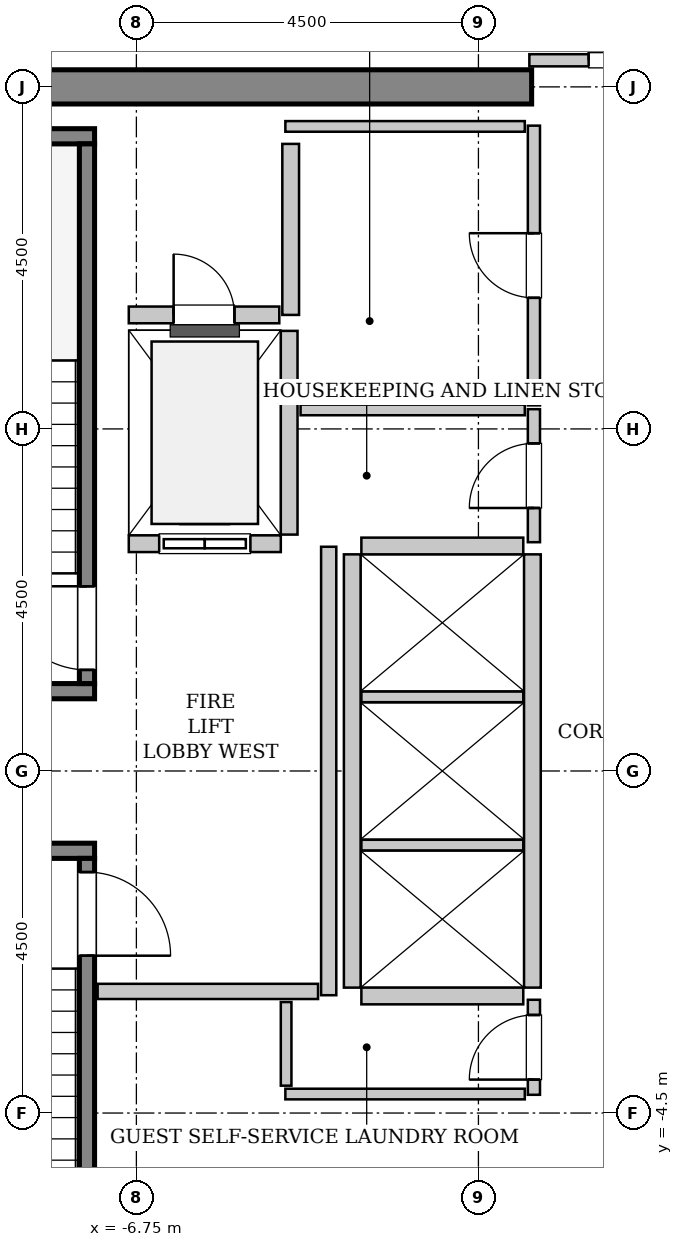
"""IFC4 building model, lengths in metres.
Left out: names, types, materials, properties, quantities, classifications, styles, units other than length and angle.
Written with IfcOpenShell. Run it as: python <this file> out.ifc"""

import sys

from ifc_helpers import new_model, si_unit, direction, frame, frame_2d, origin, place, context, subcontext, project, spatial, rectangle, extrude, source, transform, mapped, element, fill, save


model = new_model("IFC4")
c1 = context("Model", 3, precision=1e-05, world=origin(), true_north=direction((0.0, 1.0)))
c2 = subcontext(c1, "Body", "Model", "MODEL_VIEW")
j1 = project(units=[si_unit("LENGTHUNIT", "METRE"), si_unit("PLANEANGLEUNIT", "RADIAN")], contexts=[c1])
p1 = place(None, origin())
s1 = spatial("IfcSite", under=j1, at=p1, CompositionType="ELEMENT")
p2 = place(p1, origin())
s2 = spatial("IfcBuilding", under=s1, at=p2, CompositionType="ELEMENT")
p3 = place(p2, frame((0.0, 0.0, 233.2)))
s3 = spatial("IfcBuildingStorey", under=s2, at=p3, CompositionType="ELEMENT", Elevation=233.2)
m1 = source(origin(), c2, "Body", "SweptSolid", [
    extrude(rectangle(XDim=9.925, YDim=0.45, at=frame_2d((4.962, 0.0))), origin(), (0.0, 0.0, 1.0), 3.8),
])
p4 = place(p3, frame((-11.475, 9.0, 0.0), z_axis=(0.0, 0.0, 1.0), x_axis=(1.0, 0.0, 0.0)))
e1 = element("IfcWall", 1, at=p4, inside=s3, PredefinedType="SHEAR", context=c2, shape_type="MappedRepresentation", body=[
    mapped(m1, transform((0.0, 0.0, 0.0), x_axis=(1.0, 0.0, 0.0), y_axis=(0.0, 1.0, 0.0), z_axis=(0.0, 0.0, 1.0), scale=1.0)),
])
m2 = source(origin(), c2, "Body", "SweptSolid", [
    extrude(rectangle(XDim=3.4, YDim=0.2, at=frame_2d((1.7, 0.0))), origin(), (0.0, 0.0, 1.0), 3.8),
])
p5 = place(p3, frame((-7.3, 1.05, 0.0), z_axis=(0.0, 0.0, 1.0), x_axis=(-1.0, 0.0, 0.0)))
e2 = element("IfcWall", 2, at=p5, inside=s3, PredefinedType="SOLIDWALL", context=c2, shape_type="MappedRepresentation", body=[
    mapped(m2, transform((0.0, 0.0, 0.0), x_axis=(1.0, 0.0, 0.0), y_axis=(0.0, 1.0, 0.0), z_axis=(0.0, 0.0, 1.0), scale=1.0)),
])
m3 = source(origin(), c2, "Body", "SweptSolid", [
    extrude(rectangle(XDim=3.73, YDim=0.2, at=frame_2d((1.865, 0.0))), origin(), (0.0, 0.0, 1.0), 3.8),
])
p6 = place(p3, frame((-7.3, 8.35, 0.0), z_axis=(0.0, 0.0, 1.0), x_axis=(-1.0, 0.0, 0.0)))
e3 = element("IfcWall", 3, at=p6, inside=s3, PredefinedType="SOLIDWALL", context=c2, shape_type="MappedRepresentation", body=[
    mapped(m3, transform((0.0, 0.0, 0.0), x_axis=(1.0, 0.0, 0.0), y_axis=(0.0, 1.0, 0.0), z_axis=(0.0, 0.0, 1.0), scale=1.0)),
])
m4 = source(origin(), c2, "Body", "SweptSolid", [
    extrude(rectangle(XDim=7.1, YDim=0.2, at=frame_2d((3.55, 0.0))), origin(), (0.0, 0.0, 1.0), 3.8),
])
p7 = place(p3, frame((-7.4, 1.15, 0.0), z_axis=(0.0, 0.0, 1.0), x_axis=(0.0, 1.0, 0.0)))
e4 = element("IfcWall", 4, at=p7, inside=s3, PredefinedType="SOLIDWALL", context=c2, shape_type="MappedRepresentation", body=[
    mapped(m4, transform((0.0, 0.0, 0.0), x_axis=(1.0, 0.0, 0.0), y_axis=(0.0, 1.0, 0.0), z_axis=(0.0, 0.0, 1.0), scale=1.0)),
])
p8 = place(p7, frame((0.18, 0.0, 0.0)))
e5 = element("IfcOpeningElement", 5, at=p8, cuts=e4, PredefinedType="OPENING", context=c2, shape_type="SweptSolid", body=[
    extrude(rectangle(XDim=1.1, YDim=2.15, at=frame_2d((0.55, 1.075))), frame((0.0, 0.11, 0.0), z_axis=(0.0, -1.0, 0.0), x_axis=(1.0, 0.0, 0.0)), (0.0, 0.0, 1.0), 0.22),
])
p9 = place(p3, frame((-10.7, -1.05, 0.0), z_axis=(0.0, 0.0, 1.0), x_axis=(1.0, 0.0, 0.0)))
e6 = element("IfcWall", 6, at=p9, inside=s3, PredefinedType="SOLIDWALL", context=c2, shape_type="MappedRepresentation", body=[
    mapped(m2, transform((0.0, 0.0, 0.0), x_axis=(1.0, 0.0, 0.0), y_axis=(0.0, 1.0, 0.0), z_axis=(0.0, 0.0, 1.0), scale=1.0)),
])
p10 = place(p3, frame((-7.4, -1.15, 0.0), z_axis=(0.0, 0.0, 1.0), x_axis=(0.0, -1.0, 0.0)))
e7 = element("IfcWall", 7, at=p10, inside=s3, PredefinedType="SOLIDWALL", context=c2, shape_type="MappedRepresentation", body=[
    mapped(m4, transform((0.0, 0.0, 0.0), x_axis=(1.0, 0.0, 0.0), y_axis=(0.0, 1.0, 0.0), z_axis=(0.0, 0.0, 1.0), scale=1.0)),
])
p11 = place(p10, frame((0.18, 0.0, 0.0)))
e8 = element("IfcOpeningElement", 8, at=p11, cuts=e7, PredefinedType="OPENING", context=c2, shape_type="SweptSolid", body=[
    extrude(rectangle(XDim=1.1, YDim=2.15, at=frame_2d((0.55, 1.075))), frame((0.0, 0.11, 0.0), z_axis=(0.0, -1.0, 0.0), x_axis=(1.0, 0.0, 0.0)), (0.0, 0.0, 1.0), 0.22),
])
m5 = source(origin(), c2, "Body", "SweptSolid", [
    extrude(rectangle(XDim=2.0, YDim=0.22, at=frame_2d((1.0, 0.0))), origin(), (0.0, 0.0, 1.0), 3.535),
])
p12 = place(p3, frame((-6.85, 2.99, 0.0), z_axis=(0.0, 0.0, 1.0), x_axis=(1.0, 0.0, 0.0)))
e9 = element("IfcWall", 9, at=p12, inside=s3, PredefinedType="SOLIDWALL", context=c2, shape_type="MappedRepresentation", body=[
    mapped(m5, transform((0.0, 0.0, 0.0), x_axis=(1.0, 0.0, 0.0), y_axis=(0.0, 1.0, 0.0), z_axis=(0.0, 0.0, 1.0), scale=1.0)),
])
p13 = place(p12, frame((0.4, 0.0, 0.0)))
e10 = element("IfcOpeningElement", 10, at=p13, cuts=e9, PredefinedType="OPENING", context=c2, shape_type="SweptSolid", body=[
    extrude(rectangle(XDim=1.2, YDim=2.2, at=frame_2d((0.6, 1.1))), frame((0.0, 0.12, 0.0), z_axis=(0.0, -1.0, 0.0), x_axis=(1.0, 0.0, 0.0)), (0.0, 0.0, 1.0), 0.24),
])
m6 = source(origin(), c2, "Body", "SweptSolid", [
    extrude(rectangle(XDim=2.68, YDim=0.22, at=frame_2d((1.34, 0.0))), origin(), (0.0, 0.0, 1.0), 3.535),
])
p14 = place(p3, frame((-4.74, 3.11, 0.0), z_axis=(0.0, 0.0, 1.0), x_axis=(0.0, 1.0, 0.0)))
e11 = element("IfcWall", 11, at=p14, inside=s3, PredefinedType="SOLIDWALL", context=c2, shape_type="MappedRepresentation", body=[
    mapped(m6, transform((0.0, 0.0, 0.0), x_axis=(1.0, 0.0, 0.0), y_axis=(0.0, 1.0, 0.0), z_axis=(0.0, 0.0, 1.0), scale=1.0)),
])
m7 = source(origin(), c2, "Body", "SweptSolid", [
    extrude(rectangle(XDim=5.7, YDim=0.22, at=frame_2d((2.85, 0.0))), origin(), (0.0, 0.0, 1.0), 3.535),
])
for number, where, z_axis, x_axis in (
    (12, (-1.54, -2.85, 0.0), (0.0, 0.0, 1.0), (0.0, 1.0, 0.0)),
    (13, (-3.91, 2.85, 0.0), (0.0, 0.0, 1.0), (0.0, -1.0, 0.0)),
):
    element("IfcWall", number, at=place(p3, frame(where, z_axis=z_axis, x_axis=x_axis)), inside=s3, PredefinedType="SOLIDWALL", context=c2, shape_type="MappedRepresentation", body=[
        mapped(m7, transform((0.0, 0.0, 0.0), x_axis=(1.0, 0.0, 0.0), y_axis=(0.0, 1.0, 0.0), z_axis=(0.0, 0.0, 1.0), scale=1.0)),
    ])
m8 = source(origin(), c2, "Body", "SweptSolid", [
    extrude(rectangle(XDim=2.13, YDim=0.22, at=frame_2d((1.065, 0.0))), origin(), (0.0, 0.0, 1.0), 3.535),
])
p15 = place(p3, frame((-3.79, -2.96, 0.0), z_axis=(0.0, 0.0, 1.0), x_axis=(1.0, 0.0, 0.0)))
e14 = element("IfcWall", 14, at=p15, inside=s3, PredefinedType="SOLIDWALL", context=c2, shape_type="MappedRepresentation", body=[
    mapped(m8, transform((0.0, 0.0, 0.0), x_axis=(1.0, 0.0, 0.0), y_axis=(0.0, 1.0, 0.0), z_axis=(0.0, 0.0, 1.0), scale=1.0)),
])
m9 = source(origin(), c2, "Body", "SweptSolid", [
    extrude(rectangle(XDim=2.13, YDim=0.14, at=frame_2d((1.065, 0.0))), origin(), (0.0, 0.0, 1.0), 3.535),
])
for number, where, z_axis, x_axis in (
    (15, (-3.79, -0.975, 0.0), (0.0, 0.0, 1.0), (1.0, 0.0, 0.0)),
    (16, (-3.79, 0.975, 0.0), (0.0, 0.0, 1.0), (1.0, 0.0, 0.0)),
):
    element("IfcWall", number, at=place(p3, frame(where, z_axis=z_axis, x_axis=x_axis)), inside=s3, PredefinedType="PARTITIONING", context=c2, shape_type="MappedRepresentation", body=[
        mapped(m9, transform((0.0, 0.0, 0.0), x_axis=(1.0, 0.0, 0.0), y_axis=(0.0, 1.0, 0.0), z_axis=(0.0, 0.0, 1.0), scale=1.0)),
    ])
p16 = place(p3, frame((-1.66, 2.96, 0.0), z_axis=(0.0, 0.0, 1.0), x_axis=(-1.0, 0.0, 0.0)))
e17 = element("IfcWall", 17, at=p16, inside=s3, PredefinedType="SOLIDWALL", context=c2, shape_type="MappedRepresentation", body=[
    mapped(m8, transform((0.0, 0.0, 0.0), x_axis=(1.0, 0.0, 0.0), y_axis=(0.0, 1.0, 0.0), z_axis=(0.0, 0.0, 1.0), scale=1.0)),
])
m10 = source(origin(), c2, "Body", "SweptSolid", [
    extrude(rectangle(XDim=2.25, YDim=0.22, at=frame_2d((1.125, 0.0))), origin(), (0.0, 0.0, 1.0), 3.535),
])
p17 = place(p3, frame((-4.72, 6.0, 0.0), z_axis=(0.0, 0.0, 1.0), x_axis=(0.0, 1.0, 0.0)))
e18 = element("IfcWall", 18, at=p17, inside=s3, PredefinedType="SOLIDWALL", context=c2, shape_type="MappedRepresentation", body=[
    mapped(m10, transform((0.0, 0.0, 0.0), x_axis=(1.0, 0.0, 0.0), y_axis=(0.0, 1.0, 0.0), z_axis=(0.0, 0.0, 1.0), scale=1.0)),
])
m11 = source(origin(), c2, "Body", "SweptSolid", [
    extrude(rectangle(XDim=1.98, YDim=0.22, at=frame_2d((0.99, 0.0))), origin(), (0.0, 0.0, 1.0), 3.535),
])
p18 = place(p3, frame((-6.85, 6.0, 0.0), z_axis=(0.0, 0.0, 1.0), x_axis=(1.0, 0.0, 0.0)))
e19 = element("IfcWall", 19, at=p18, inside=s3, PredefinedType="SOLIDWALL", context=c2, shape_type="MappedRepresentation", body=[
    mapped(m11, transform((0.0, 0.0, 0.0), x_axis=(1.0, 0.0, 0.0), y_axis=(0.0, 1.0, 0.0), z_axis=(0.0, 0.0, 1.0), scale=1.0)),
])
p19 = place(p18, frame((0.59, 0.0, 0.0)))
e20 = element("IfcOpeningElement", 20, at=p19, cuts=e19, PredefinedType="OPENING", context=c2, shape_type="SweptSolid", body=[
    extrude(rectangle(XDim=0.8, YDim=2.0, at=frame_2d((0.4, 1.0))), frame((0.0, 0.12, 0.0), z_axis=(0.0, -1.0, 0.0), x_axis=(1.0, 0.0, 0.0)), (0.0, 0.0, 1.0), 0.24),
])
m12 = source(origin(), c2, "Body", "SweptSolid", [
    extrude(rectangle(XDim=5.9, YDim=0.2, at=frame_2d((2.95, 0.0))), origin(), (0.0, 0.0, 1.0), 3.535),
])
p20 = place(p3, frame((-4.22, -2.95, 0.0), z_axis=(0.0, 0.0, 1.0), x_axis=(0.0, 1.0, 0.0)))
e21 = element("IfcWall", 21, at=p20, inside=s3, PredefinedType="PARTITIONING", context=c2, shape_type="MappedRepresentation", body=[
    mapped(m12, transform((0.0, 0.0, 0.0), x_axis=(1.0, 0.0, 0.0), y_axis=(0.0, 1.0, 0.0), z_axis=(0.0, 0.0, 1.0), scale=1.0)),
])
m13 = source(origin(), c2, "Body", "SweptSolid", [
    extrude(rectangle(XDim=2.9, YDim=0.2, at=frame_2d((1.45, 0.0))), origin(), (0.0, 0.0, 1.0), 3.535),
])
p21 = place(p3, frame((-7.26, -2.9, 0.0), z_axis=(0.0, 0.0, 1.0), x_axis=(1.0, 0.0, 0.0)))
e22 = element("IfcWall", 22, at=p21, inside=s3, PredefinedType="PARTITIONING", context=c2, shape_type="MappedRepresentation", body=[
    mapped(m13, transform((0.0, 0.0, 0.0), x_axis=(1.0, 0.0, 0.0), y_axis=(0.0, 1.0, 0.0), z_axis=(0.0, 0.0, 1.0), scale=1.0)),
])
m14 = source(origin(), c2, "Body", "SweptSolid", [
    extrude(rectangle(XDim=3.16, YDim=0.16, at=frame_2d((1.58, 0.0))), origin(), (0.0, 0.0, 1.0), 2.625),
])
p22 = place(p3, frame((-1.58, 9.35, 0.0), z_axis=(0.0, 0.0, 1.0), x_axis=(1.0, 0.0, 0.0)))
e23 = element("IfcWall", 23, at=p22, inside=s3, PredefinedType="PARTITIONING", context=c2, shape_type="MappedRepresentation", body=[
    mapped(m14, transform((0.0, 0.0, 0.0), x_axis=(1.0, 0.0, 0.0), y_axis=(0.0, 1.0, 0.0), z_axis=(0.0, 0.0, 1.0), scale=1.0)),
])
p23 = place(p22, frame((0.78, 0.0, 0.0)))
e24 = element("IfcOpeningElement", 24, at=p23, cuts=e23, PredefinedType="OPENING", context=c2, shape_type="SweptSolid", body=[
    extrude(rectangle(XDim=1.6, YDim=2.3, at=frame_2d((0.8, 1.15))), frame((0.0, 0.09, 0.0), z_axis=(0.0, -1.0, 0.0), x_axis=(1.0, 0.0, 0.0)), (0.0, 0.0, 1.0), 0.18),
])
m15 = source(origin(), c2, "Body", "SweptSolid", [
    extrude(rectangle(XDim=1.75, YDim=0.16, at=frame_2d((0.875, 0.0))), origin(), (0.0, 0.0, 1.0), 3.535),
])
p24 = place(p3, frame((-1.52, 3.01, 0.0), z_axis=(0.0, 0.0, 1.0), x_axis=(0.0, 1.0, 0.0)))
e25 = element("IfcWall", 25, at=p24, inside=s3, PredefinedType="PARTITIONING", context=c2, shape_type="MappedRepresentation", body=[
    mapped(m15, transform((0.0, 0.0, 0.0), x_axis=(1.0, 0.0, 0.0), y_axis=(0.0, 1.0, 0.0), z_axis=(0.0, 0.0, 1.0), scale=1.0)),
])
p25 = place(p24, frame((0.45, 0.0, 0.0)))
e26 = element("IfcOpeningElement", 26, at=p25, cuts=e25, PredefinedType="OPENING", context=c2, shape_type="SweptSolid", body=[
    extrude(rectangle(XDim=0.85, YDim=2.1, at=frame_2d((0.425, 1.05))), frame((0.0, 0.09, 0.0), z_axis=(0.0, -1.0, 0.0), x_axis=(1.0, 0.0, 0.0)), (0.0, 0.0, 1.0), 0.18),
])
m16 = source(origin(), c2, "Body", "SweptSolid", [
    extrude(rectangle(XDim=2.95, YDim=0.14, at=frame_2d((1.475, 0.0))), origin(), (0.0, 0.0, 1.0), 3.535),
])
p26 = place(p3, frame((-4.59, 4.75, 0.0), z_axis=(0.0, 0.0, 1.0), x_axis=(1.0, 0.0, 0.0)))
e27 = element("IfcWall", 27, at=p26, inside=s3, PredefinedType="PARTITIONING", context=c2, shape_type="MappedRepresentation", body=[
    mapped(m16, transform((0.0, 0.0, 0.0), x_axis=(1.0, 0.0, 0.0), y_axis=(0.0, 1.0, 0.0), z_axis=(0.0, 0.0, 1.0), scale=1.0)),
])
m17 = source(origin(), c2, "Body", "SweptSolid", [
    extrude(rectangle(XDim=3.68, YDim=0.16, at=frame_2d((1.84, 0.0))), origin(), (0.0, 0.0, 1.0), 3.535),
])
p27 = place(p3, frame((-1.52, 4.81, 0.0), z_axis=(0.0, 0.0, 1.0), x_axis=(0.0, 1.0, 0.0)))
e28 = element("IfcWall", 28, at=p27, inside=s3, PredefinedType="PARTITIONING", context=c2, shape_type="MappedRepresentation", body=[
    mapped(m17, transform((0.0, 0.0, 0.0), x_axis=(1.0, 0.0, 0.0), y_axis=(0.0, 1.0, 0.0), z_axis=(0.0, 0.0, 1.0), scale=1.0)),
])
p28 = place(p27, frame((1.415, 0.0, 0.0)))
e29 = element("IfcOpeningElement", 29, at=p28, cuts=e28, PredefinedType="OPENING", context=c2, shape_type="SweptSolid", body=[
    extrude(rectangle(XDim=0.85, YDim=2.1, at=frame_2d((0.425, 1.05))), frame((0.0, 0.09, 0.0), z_axis=(0.0, -1.0, 0.0), x_axis=(1.0, 0.0, 0.0)), (0.0, 0.0, 1.0), 0.18),
])
m18 = source(origin(), c2, "Body", "SweptSolid", [
    extrude(rectangle(XDim=3.15, YDim=0.14, at=frame_2d((1.575, 0.0))), origin(), (0.0, 0.0, 1.0), 3.535),
])
p29 = place(p3, frame((-4.79, 8.48, 0.0), z_axis=(0.0, 0.0, 1.0), x_axis=(1.0, 0.0, 0.0)))
e30 = element("IfcWall", 30, at=p29, inside=s3, PredefinedType="PARTITIONING", context=c2, shape_type="MappedRepresentation", body=[
    mapped(m18, transform((0.0, 0.0, 0.0), x_axis=(1.0, 0.0, 0.0), y_axis=(0.0, 1.0, 0.0), z_axis=(0.0, 0.0, 1.0), scale=1.0)),
])
m19 = source(origin(), c2, "Body", "SweptSolid", [
    extrude(rectangle(XDim=1.25, YDim=0.16, at=frame_2d((0.625, 0.0))), origin(), (0.0, 0.0, 1.0), 3.535),
])
p30 = place(p3, frame((-1.52, -4.26, 0.0), z_axis=(0.0, 0.0, 1.0), x_axis=(0.0, 1.0, 0.0)))
e31 = element("IfcWall", 31, at=p30, inside=s3, PredefinedType="PARTITIONING", context=c2, shape_type="MappedRepresentation", body=[
    mapped(m19, transform((0.0, 0.0, 0.0), x_axis=(1.0, 0.0, 0.0), y_axis=(0.0, 1.0, 0.0), z_axis=(0.0, 0.0, 1.0), scale=1.0)),
])
p31 = place(p30, frame((0.2, 0.0, 0.0)))
e32 = element("IfcOpeningElement", 32, at=p31, cuts=e31, PredefinedType="OPENING", context=c2, shape_type="SweptSolid", body=[
    extrude(rectangle(XDim=0.85, YDim=2.1, at=frame_2d((0.425, 1.05))), frame((0.0, 0.09, 0.0), z_axis=(0.0, -1.0, 0.0), x_axis=(1.0, 0.0, 0.0)), (0.0, 0.0, 1.0), 0.18),
])
p32 = place(p3, frame((-4.79, -4.25, 0.0), z_axis=(0.0, 0.0, 1.0), x_axis=(1.0, 0.0, 0.0)))
e33 = element("IfcWall", 33, at=p32, inside=s3, PredefinedType="PARTITIONING", context=c2, shape_type="MappedRepresentation", body=[
    mapped(m18, transform((0.0, 0.0, 0.0), x_axis=(1.0, 0.0, 0.0), y_axis=(0.0, 1.0, 0.0), z_axis=(0.0, 0.0, 1.0), scale=1.0)),
])
m20 = source(origin(), c2, "Body", "SweptSolid", [
    extrude(rectangle(XDim=1.1, YDim=0.14, at=frame_2d((0.55, 0.0))), origin(), (0.0, 0.0, 1.0), 3.535),
])
p33 = place(p3, frame((-4.78, -4.14, 0.0), z_axis=(0.0, 0.0, 1.0), x_axis=(0.0, 1.0, 0.0)))
e34 = element("IfcWall", 34, at=p33, inside=s3, PredefinedType="PARTITIONING", context=c2, shape_type="MappedRepresentation", body=[
    mapped(m20, transform((0.0, 0.0, 0.0), x_axis=(1.0, 0.0, 0.0), y_axis=(0.0, 1.0, 0.0), z_axis=(0.0, 0.0, 1.0), scale=1.0)),
])
m21 = source(origin(), c2, "Body", "SweptSolid", [
    extrude(rectangle(XDim=1.1, YDim=2.15, at=frame_2d((0.55, 1.075))), frame((0.0, 0.025, 0.0), z_axis=(0.0, -1.0, 0.0), x_axis=(1.0, 0.0, 0.0)), (0.0, 0.0, 1.0), 0.05),
])
p34 = place(p8, origin())
e35 = element("IfcDoor", 35, at=p34, inside=s3, OperationType="SINGLE_SWING_RIGHT", PredefinedType="DOOR", context=c2, shape_type="MappedRepresentation", body=[
    mapped(m21, transform((0.0, 0.0, 0.0), x_axis=(1.0, 0.0, 0.0), y_axis=(0.0, 1.0, 0.0), z_axis=(0.0, 0.0, 1.0), scale=1.0)),
])
fill(e5, e35)
p35 = place(p11, origin())
e36 = element("IfcDoor", 36, at=p35, inside=s3, OperationType="SINGLE_SWING_RIGHT", PredefinedType="DOOR", context=c2, shape_type="MappedRepresentation", body=[
    mapped(m21, transform((0.0, 0.0, 0.0), x_axis=(1.0, 0.0, 0.0), y_axis=(0.0, 1.0, 0.0), z_axis=(0.0, 0.0, 1.0), scale=1.0)),
])
fill(e8, e36)
m22 = source(origin(), c2, "Body", "SweptSolid", [
    extrude(rectangle(XDim=1.2, YDim=2.2, at=frame_2d((0.6, 1.1))), frame((0.0, 0.025, 0.0), z_axis=(0.0, -1.0, 0.0), x_axis=(1.0, 0.0, 0.0)), (0.0, 0.0, 1.0), 0.05),
])
p36 = place(p13, origin())
e37 = element("IfcDoor", 37, at=p36, inside=s3, OperationType="SLIDING_TO_LEFT", PredefinedType="DOOR", context=c2, shape_type="MappedRepresentation", body=[
    mapped(m22, transform((0.0, 0.0, 0.0), x_axis=(1.0, 0.0, 0.0), y_axis=(0.0, 1.0, 0.0), z_axis=(0.0, 0.0, 1.0), scale=1.0)),
])
fill(e10, e37)
m23 = source(origin(), c2, "Body", "SweptSolid", [
    extrude(rectangle(XDim=0.8, YDim=2.0, at=frame_2d((0.4, 1.0))), frame((0.0, 0.025, 0.0), z_axis=(0.0, -1.0, 0.0), x_axis=(1.0, 0.0, 0.0)), (0.0, 0.0, 1.0), 0.05),
])
p37 = place(p19, origin())
e38 = element("IfcDoor", 38, at=p37, inside=s3, OperationType="SINGLE_SWING_LEFT", PredefinedType="TRAPDOOR", context=c2, shape_type="MappedRepresentation", body=[
    mapped(m23, transform((0.0, 0.0, 0.0), x_axis=(1.0, 0.0, 0.0), y_axis=(0.0, 1.0, 0.0), z_axis=(0.0, 0.0, 1.0), scale=1.0)),
])
fill(e20, e38)
m24 = source(origin(), c2, "Body", "SweptSolid", [
    extrude(rectangle(XDim=1.6, YDim=2.3, at=frame_2d((0.8, 1.15))), frame((0.0, 0.025, 0.0), z_axis=(0.0, -1.0, 0.0), x_axis=(1.0, 0.0, 0.0)), (0.0, 0.0, 1.0), 0.05),
])
p38 = place(p23, origin())
e39 = element("IfcDoor", 39, at=p38, inside=s3, OperationType="DOUBLE_DOOR_SINGLE_SWING", PredefinedType="DOOR", context=c2, shape_type="MappedRepresentation", body=[
    mapped(m24, transform((0.0, 0.0, 0.0), x_axis=(1.0, 0.0, 0.0), y_axis=(0.0, 1.0, 0.0), z_axis=(0.0, 0.0, 1.0), scale=1.0)),
])
fill(e24, e39)
m25 = source(origin(), c2, "Body", "SweptSolid", [
    extrude(rectangle(XDim=0.85, YDim=2.1, at=frame_2d((0.425, 1.05))), frame((0.0, 0.025, 0.0), z_axis=(0.0, -1.0, 0.0), x_axis=(1.0, 0.0, 0.0)), (0.0, 0.0, 1.0), 0.05),
])
p39 = place(p25, origin())
e40 = element("IfcDoor", 40, at=p39, inside=s3, OperationType="SINGLE_SWING_LEFT", PredefinedType="DOOR", context=c2, shape_type="MappedRepresentation", body=[
    mapped(m25, transform((0.0, 0.0, 0.0), x_axis=(1.0, 0.0, 0.0), y_axis=(0.0, 1.0, 0.0), z_axis=(0.0, 0.0, 1.0), scale=1.0)),
])
fill(e26, e40)
p40 = place(p28, origin())
e41 = element("IfcDoor", 41, at=p40, inside=s3, OperationType="SINGLE_SWING_RIGHT", PredefinedType="DOOR", context=c2, shape_type="MappedRepresentation", body=[
    mapped(m25, transform((0.0, 0.0, 0.0), x_axis=(1.0, 0.0, 0.0), y_axis=(0.0, 1.0, 0.0), z_axis=(0.0, 0.0, 1.0), scale=1.0)),
])
fill(e29, e41)
p41 = place(p31, origin())
e42 = element("IfcDoor", 42, at=p41, inside=s3, OperationType="SINGLE_SWING_LEFT", PredefinedType="DOOR", context=c2, shape_type="MappedRepresentation", body=[
    mapped(m25, transform((0.0, 0.0, 0.0), x_axis=(1.0, 0.0, 0.0), y_axis=(0.0, 1.0, 0.0), z_axis=(0.0, 0.0, 1.0), scale=1.0)),
])
fill(e32, e42)
save(model, sys.argv[1])
